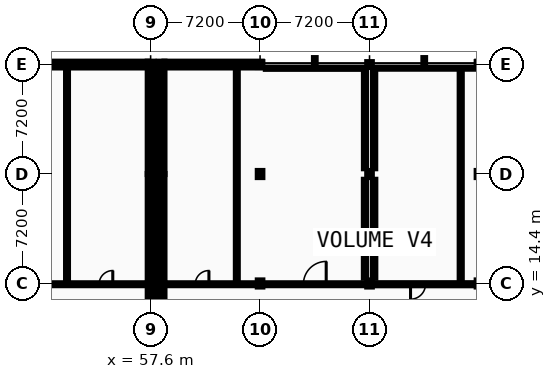
"""IFC4 building model, lengths in metres.
Left out: names, types, materials, properties, quantities, classifications, styles, units other than length and angle.
Written with IfcOpenShell. Run it as: python <this file> out.ifc"""

import sys

from ifc_helpers import new_model, si_unit, direction, frame, frame_2d, origin, origin_2d, place, context, subcontext, project, spatial, rectangle, i_section, extrude, element, fill, save


model = new_model("IFC4")
c1 = context("Model", 3, precision=1e-05, world=origin(), true_north=direction((0.0, 1.0)))
c2 = subcontext(c1, "Body", "Model", "MODEL_VIEW")
j1 = project(units=[si_unit("LENGTHUNIT", "METRE"), si_unit("PLANEANGLEUNIT", "RADIAN")], contexts=[c1])
p1 = place(None, origin())
s1 = spatial("IfcSite", under=j1, at=p1, CompositionType="ELEMENT")
p2 = place(p1, origin())
s2 = spatial("IfcBuilding", under=s1, at=p2, CompositionType="ELEMENT")
p3 = place(p2, frame((0.0, 0.0, 5.2)))
s3 = spatial("IfcBuildingStorey", under=s2, at=p3, CompositionType="ELEMENT", Elevation=5.2)
for number, where, z_axis, x_axis in (
    (1, (57.6, 14.4, 0.0), (0.0, 0.0, 1.0), (1.0, 0.0, 0.0)),
    (2, (57.6, 21.6, 0.0), (0.0, 0.0, 1.0), (1.0, 0.0, 0.0)),
):
    element("IfcColumn", number, at=place(p3, frame(where, z_axis=z_axis, x_axis=x_axis)), inside=s3, PredefinedType="COLUMN", context=c2, shape_type="SweptSolid", body=[
        extrude(i_section(OverallWidth=0.3, OverallDepth=0.4, WebThickness=0.013, FlangeThickness=0.024, FilletRadius=0.027, at=origin_2d()), origin(), (0.0, 0.0, 1.0), 4.4),
    ])
p4 = place(p3, frame((57.6, 28.8, 0.0), z_axis=(0.0, 0.0, 1.0), x_axis=(1.0, 0.0, 0.0)))
e3 = element("IfcColumn", 3, at=p4, inside=s3, PredefinedType="COLUMN", context=c2, shape_type="SweptSolid", body=[
    extrude(i_section(OverallWidth=0.3, OverallDepth=0.32, WebThickness=0.011, FlangeThickness=0.021, FilletRadius=0.027, at=origin_2d()), origin(), (0.0, 0.0, 1.0), 4.4),
])
for number, where, z_axis, x_axis in (
    (4, (58.32, 14.4, 0.0), (0.0, 0.0, 1.0), (1.0, 0.0, 0.0)),
    (5, (58.32, 21.6, 0.0), (0.0, 0.0, 1.0), (1.0, 0.0, 0.0)),
):
    element("IfcColumn", number, at=place(p3, frame(where, z_axis=z_axis, x_axis=x_axis)), inside=s3, PredefinedType="COLUMN", context=c2, shape_type="SweptSolid", body=[
        extrude(i_section(OverallWidth=0.3, OverallDepth=0.4, WebThickness=0.013, FlangeThickness=0.024, FilletRadius=0.027, at=origin_2d()), origin(), (0.0, 0.0, 1.0), 4.4),
    ])
p5 = place(p3, frame((58.32, 28.8, 0.0), z_axis=(0.0, 0.0, 1.0), x_axis=(1.0, 0.0, 0.0)))
e6 = element("IfcColumn", 6, at=p5, inside=s3, PredefinedType="COLUMN", context=c2, shape_type="SweptSolid", body=[
    extrude(i_section(OverallWidth=0.3, OverallDepth=0.32, WebThickness=0.011, FlangeThickness=0.021, FilletRadius=0.027, at=origin_2d()), origin(), (0.0, 0.0, 1.0), 4.4),
])
for number, where, z_axis, x_axis in (
    (7, (64.8, 14.4, 0.0), (0.0, 0.0, 1.0), (1.0, 0.0, 0.0)),
    (8, (64.8, 21.6, 0.0), (0.0, 0.0, 1.0), (1.0, 0.0, 0.0)),
):
    element("IfcColumn", number, at=place(p3, frame(where, z_axis=z_axis, x_axis=x_axis)), inside=s3, PredefinedType="COLUMN", context=c2, shape_type="SweptSolid", body=[
        extrude(i_section(OverallWidth=0.3, OverallDepth=0.4, WebThickness=0.013, FlangeThickness=0.024, FilletRadius=0.027, at=origin_2d()), origin(), (0.0, 0.0, 1.0), 4.4),
    ])
p6 = place(p3, frame((64.8, 28.8, 0.0), z_axis=(0.0, 0.0, 1.0), x_axis=(1.0, 0.0, 0.0)))
e9 = element("IfcColumn", 9, at=p6, inside=s3, PredefinedType="COLUMN", context=c2, shape_type="SweptSolid", body=[
    extrude(i_section(OverallWidth=0.3, OverallDepth=0.32, WebThickness=0.011, FlangeThickness=0.021, FilletRadius=0.027, at=origin_2d()), origin(), (0.0, 0.0, 1.0), 4.4),
])
for number, where, z_axis, x_axis in (
    (10, (72.0, 14.4, 0.0), (0.0, 0.0, 1.0), (1.0, 0.0, 0.0)),
    (11, (72.0, 21.6, 0.0), (0.0, 0.0, 1.0), (1.0, 0.0, 0.0)),
):
    element("IfcColumn", number, at=place(p3, frame(where, z_axis=z_axis, x_axis=x_axis)), inside=s3, PredefinedType="COLUMN", context=c2, shape_type="SweptSolid", body=[
        extrude(i_section(OverallWidth=0.3, OverallDepth=0.4, WebThickness=0.013, FlangeThickness=0.024, FilletRadius=0.027, at=origin_2d()), origin(), (0.0, 0.0, 1.0), 4.4),
    ])
p7 = place(p3, frame((72.0, 28.8, 0.0), z_axis=(0.0, 0.0, 1.0), x_axis=(1.0, 0.0, 0.0)))
e12 = element("IfcColumn", 12, at=p7, inside=s3, PredefinedType="COLUMN", context=c2, shape_type="SweptSolid", body=[
    extrude(i_section(OverallWidth=0.3, OverallDepth=0.32, WebThickness=0.011, FlangeThickness=0.021, FilletRadius=0.027, at=origin_2d()), origin(), (0.0, 0.0, 1.0), 4.4),
])
p8 = place(p3, frame((57.41, 28.8, 0.0), z_axis=(0.0, 0.0, 1.0), x_axis=(-1.0, 0.0, 0.0)))
e13 = element("IfcWall", 13, at=p8, inside=s3, PredefinedType="STANDARD", context=c2, shape_type="SweptSolid", body=[
    extrude(rectangle(XDim=7.12, YDim=0.38, at=frame_2d((3.56, 0.0))), origin(), (0.0, 0.0, 1.0), 3.88),
])
p9 = place(p8, frame((1.672, 0.0, 0.95)))
e14 = element("IfcOpeningElement", 14, at=p9, cuts=e13, PredefinedType="OPENING", context=c2, shape_type="SweptSolid", body=[
    extrude(rectangle(XDim=0.928, YDim=1.332, at=frame_2d((0.464, 0.666))), frame((0.0, 0.2, 0.0), z_axis=(0.0, -1.0, 0.0), x_axis=(1.0, 0.0, 0.0)), (0.0, 0.0, 1.0), 0.4),
])
p10 = place(p3, frame((57.6, 8.9, 0.0), z_axis=(0.0, 0.0, 1.0), x_axis=(0.0, 1.0, 0.0)))
e15 = element("IfcWall", 15, at=p10, inside=s3, PredefinedType="STANDARD", context=c2, shape_type="SweptSolid", body=[
    extrude(rectangle(XDim=5.5, YDim=0.38, at=frame_2d((2.75, 0.0))), origin(), (0.0, 0.0, 1.0), 4.185),
])
p11 = place(p3, frame((57.6, 14.4, 0.0), z_axis=(0.0, 0.0, 1.0), x_axis=(0.0, 1.0, 0.0)))
e16 = element("IfcWall", 16, at=p11, inside=s3, PredefinedType="STANDARD", context=c2, shape_type="SweptSolid", body=[
    extrude(rectangle(XDim=7.2, YDim=0.38, at=frame_2d((3.6, 0.0))), origin(), (0.0, 0.0, 1.0), 3.88),
])
p12 = place(p11, frame((1.577, 0.0, 0.95)))
e17 = element("IfcOpeningElement", 17, at=p12, cuts=e16, PredefinedType="OPENING", context=c2, shape_type="SweptSolid", body=[
    extrude(rectangle(XDim=1.166, YDim=1.332, at=frame_2d((0.583, 0.666))), frame((0.0, 0.2, 0.0), z_axis=(0.0, -1.0, 0.0), x_axis=(1.0, 0.0, 0.0)), (0.0, 0.0, 1.0), 0.4),
])
p13 = place(p11, frame((4.457, 0.0, 0.95)))
e18 = element("IfcOpeningElement", 18, at=p13, cuts=e16, PredefinedType="OPENING", context=c2, shape_type="SweptSolid", body=[
    extrude(rectangle(XDim=1.166, YDim=1.332, at=frame_2d((0.583, 0.666))), frame((0.0, 0.2, 0.0), z_axis=(0.0, -1.0, 0.0), x_axis=(1.0, 0.0, 0.0)), (0.0, 0.0, 1.0), 0.4),
])
p14 = place(p3, frame((57.6, 21.6, 0.0), z_axis=(0.0, 0.0, 1.0), x_axis=(0.0, 1.0, 0.0)))
e19 = element("IfcWall", 19, at=p14, inside=s3, PredefinedType="STANDARD", context=c2, shape_type="SweptSolid", body=[
    extrude(rectangle(XDim=7.39, YDim=0.38, at=frame_2d((3.695, 0.0))), origin(), (0.0, 0.0, 1.0), 3.88),
])
p15 = place(p14, frame((1.617, 0.0, 0.95)))
e20 = element("IfcOpeningElement", 20, at=p15, cuts=e19, PredefinedType="OPENING", context=c2, shape_type="SweptSolid", body=[
    extrude(rectangle(XDim=1.2, YDim=1.332, at=frame_2d((0.6, 0.666))), frame((0.0, 0.2, 0.0), z_axis=(0.0, -1.0, 0.0), x_axis=(1.0, 0.0, 0.0)), (0.0, 0.0, 1.0), 0.4),
])
p16 = place(p14, frame((4.573, 0.0, 0.95)))
e21 = element("IfcOpeningElement", 21, at=p16, cuts=e19, PredefinedType="OPENING", context=c2, shape_type="SweptSolid", body=[
    extrude(rectangle(XDim=1.2, YDim=1.332, at=frame_2d((0.6, 0.666))), frame((0.0, 0.2, 0.0), z_axis=(0.0, -1.0, 0.0), x_axis=(1.0, 0.0, 0.0)), (0.0, 0.0, 1.0), 0.4),
])
p17 = place(p3, frame((64.91, 28.8, 0.0), z_axis=(0.0, 0.0, 1.0), x_axis=(-1.0, 0.0, 0.0)))
e22 = element("IfcWall", 22, at=p17, inside=s3, PredefinedType="STANDARD", context=c2, shape_type="SweptSolid", body=[
    extrude(rectangle(XDim=6.4, YDim=0.38, at=frame_2d((3.2, 0.0))), origin(), (0.0, 0.0, 1.0), 3.88),
])
p18 = place(p3, frame((58.32, 14.4, 0.0), z_axis=(0.0, 0.0, 1.0), x_axis=(0.0, -1.0, 0.0)))
e23 = element("IfcWall", 23, at=p18, inside=s3, PredefinedType="STANDARD", context=c2, shape_type="SweptSolid", body=[
    extrude(rectangle(XDim=5.5, YDim=0.38, at=frame_2d((2.75, 0.0))), origin(), (0.0, 0.0, 1.0), 4.185),
])
p19 = place(p3, frame((58.32, 21.6, 0.0), z_axis=(0.0, 0.0, 1.0), x_axis=(0.0, -1.0, 0.0)))
e24 = element("IfcWall", 24, at=p19, inside=s3, PredefinedType="STANDARD", context=c2, shape_type="SweptSolid", body=[
    extrude(rectangle(XDim=7.2, YDim=0.38, at=frame_2d((3.6, 0.0))), origin(), (0.0, 0.0, 1.0), 3.88),
])
p20 = place(p19, frame((1.713, 0.0, 0.95)))
e25 = element("IfcOpeningElement", 25, at=p20, cuts=e24, PredefinedType="OPENING", context=c2, shape_type="SweptSolid", body=[
    extrude(rectangle(XDim=0.894, YDim=1.296, at=frame_2d((0.447, 0.648))), frame((0.0, 0.2, 0.0), z_axis=(0.0, -1.0, 0.0), x_axis=(1.0, 0.0, 0.0)), (0.0, 0.0, 1.0), 0.4),
])
p21 = place(p19, frame((4.593, 0.0, 0.95)))
e26 = element("IfcOpeningElement", 26, at=p21, cuts=e24, PredefinedType="OPENING", context=c2, shape_type="SweptSolid", body=[
    extrude(rectangle(XDim=0.894, YDim=1.296, at=frame_2d((0.447, 0.648))), frame((0.0, 0.2, 0.0), z_axis=(0.0, -1.0, 0.0), x_axis=(1.0, 0.0, 0.0)), (0.0, 0.0, 1.0), 0.4),
])
p22 = place(p3, frame((58.32, 28.99, 0.0), z_axis=(0.0, 0.0, 1.0), x_axis=(0.0, -1.0, 0.0)))
e27 = element("IfcWall", 27, at=p22, inside=s3, PredefinedType="STANDARD", context=c2, shape_type="SweptSolid", body=[
    extrude(rectangle(XDim=7.39, YDim=0.38, at=frame_2d((3.695, 0.0))), origin(), (0.0, 0.0, 1.0), 3.88),
])
p23 = place(p22, frame((1.753, 0.0, 0.95)))
e28 = element("IfcOpeningElement", 28, at=p23, cuts=e27, PredefinedType="OPENING", context=c2, shape_type="SweptSolid", body=[
    extrude(rectangle(XDim=0.928, YDim=1.296, at=frame_2d((0.464, 0.648))), frame((0.0, 0.2, 0.0), z_axis=(0.0, -1.0, 0.0), x_axis=(1.0, 0.0, 0.0)), (0.0, 0.0, 1.0), 0.4),
])
p24 = place(p22, frame((4.709, 0.0, 0.95)))
e29 = element("IfcOpeningElement", 29, at=p24, cuts=e27, PredefinedType="OPENING", context=c2, shape_type="SweptSolid", body=[
    extrude(rectangle(XDim=0.928, YDim=1.296, at=frame_2d((0.464, 0.648))), frame((0.0, 0.2, 0.0), z_axis=(0.0, -1.0, 0.0), x_axis=(1.0, 0.0, 0.0)), (0.0, 0.0, 1.0), 0.4),
])
p25 = place(p3, frame((50.78, 14.35, 0.0), z_axis=(0.0, 0.0, 1.0), x_axis=(1.0, 0.0, 0.0)))
e30 = element("IfcWall", 30, at=p25, inside=s3, PredefinedType="PARTITIONING", context=c2, shape_type="SweptSolid", body=[
    extrude(rectangle(XDim=6.44, YDim=0.125, at=frame_2d((3.22, 0.0))), origin(), (0.0, 0.0, 1.0), 3.88),
])
p26 = place(p25, frame((3.43, 0.0, 0.0)))
e31 = element("IfcOpeningElement", 31, at=p26, cuts=e30, PredefinedType="OPENING", context=c2, shape_type="SweptSolid", body=[
    extrude(rectangle(XDim=0.9, YDim=2.1, at=frame_2d((0.45, 1.05))), frame((0.0, 0.073, 0.0), z_axis=(0.0, -1.0, 0.0), x_axis=(1.0, 0.0, 0.0)), (0.0, 0.0, 1.0), 0.145),
])
p27 = place(p3, frame((58.7, 14.35, 0.0), z_axis=(0.0, 0.0, 1.0), x_axis=(1.0, 0.0, 0.0)))
e32 = element("IfcWall", 32, at=p27, inside=s3, PredefinedType="PARTITIONING", context=c2, shape_type="SweptSolid", body=[
    extrude(rectangle(XDim=5.72, YDim=0.125, at=frame_2d((2.86, 0.0))), origin(), (0.0, 0.0, 1.0), 3.88),
])
p28 = place(p27, frame((1.835, 0.0, 0.0)))
e33 = element("IfcOpeningElement", 33, at=p28, cuts=e32, PredefinedType="OPENING", context=c2, shape_type="SweptSolid", body=[
    extrude(rectangle(XDim=0.9, YDim=2.1, at=frame_2d((0.45, 1.05))), frame((0.0, 0.073, 0.0), z_axis=(0.0, -1.0, 0.0), x_axis=(1.0, 0.0, 0.0)), (0.0, 0.0, 1.0), 0.145),
])
p29 = place(p3, frame((65.18, 14.35, 0.0), z_axis=(0.0, 0.0, 1.0), x_axis=(1.0, 0.0, 0.0)))
e34 = element("IfcWall", 34, at=p29, inside=s3, PredefinedType="PARTITIONING", context=c2, shape_type="SweptSolid", body=[
    extrude(rectangle(XDim=6.44, YDim=0.125, at=frame_2d((3.22, 0.0))), origin(), (0.0, 0.0, 1.0), 3.88),
])
p30 = place(p29, frame((2.47, 0.0, 0.0)))
e35 = element("IfcOpeningElement", 35, at=p30, cuts=e34, PredefinedType="OPENING", context=c2, shape_type="SweptSolid", body=[
    extrude(rectangle(XDim=1.5, YDim=2.2, at=frame_2d((0.75, 1.1))), frame((0.0, 0.073, 0.0), z_axis=(0.0, -1.0, 0.0), x_axis=(1.0, 0.0, 0.0)), (0.0, 0.0, 1.0), 0.145),
])
p31 = place(p3, frame((72.38, 14.35, 0.0), z_axis=(0.0, 0.0, 1.0), x_axis=(1.0, 0.0, 0.0)))
e36 = element("IfcWall", 36, at=p31, inside=s3, PredefinedType="PARTITIONING", context=c2, shape_type="SweptSolid", body=[
    extrude(rectangle(XDim=6.44, YDim=0.135, at=frame_2d((3.22, 0.0))), origin(), (0.0, 0.0, 1.0), 3.88),
])
p32 = place(p31, frame((2.318, 0.0, 0.0)))
e37 = element("IfcOpeningElement", 37, at=p32, cuts=e36, PredefinedType="OPENING", context=c2, shape_type="SweptSolid", body=[
    extrude(rectangle(XDim=0.984, YDim=2.124, at=frame_2d((0.492, 1.062))), frame((0.0, 0.078, 0.0), z_axis=(0.0, -1.0, 0.0), x_axis=(1.0, 0.0, 0.0)), (0.0, 0.0, 1.0), 0.155),
])
p33 = place(p3, frame((65.18, 28.6, 0.0), z_axis=(0.0, 0.0, 1.0), x_axis=(1.0, 0.0, 0.0)))
e38 = element("IfcWall", 38, at=p33, inside=s3, PredefinedType="PARTITIONING", context=c2, shape_type="SweptSolid", body=[
    extrude(rectangle(XDim=6.44, YDim=0.16, at=frame_2d((3.22, 0.0))), origin(), (0.0, 0.0, 1.0), 3.88),
])
p34 = place(p3, frame((72.38, 28.6, 0.0), z_axis=(0.0, 0.0, 1.0), x_axis=(1.0, 0.0, 0.0)))
e39 = element("IfcWall", 39, at=p34, inside=s3, PredefinedType="PARTITIONING", context=c2, shape_type="SweptSolid", body=[
    extrude(rectangle(XDim=6.44, YDim=0.142, at=frame_2d((3.22, 0.0))), origin(), (0.0, 0.0, 1.0), 3.88),
])
for number, where, z_axis, x_axis in (
    (40, (52.1, 14.413, 0.0), (0.0, 0.0, 1.0), (0.0, 1.0, 0.0)),
    (41, (63.27, 14.413, 0.0), (0.0, 0.0, 1.0), (0.0, 1.0, 0.0)),
):
    element("IfcWall", number, at=place(p3, frame(where, z_axis=z_axis, x_axis=x_axis)), inside=s3, PredefinedType="PARTITIONING", context=c2, shape_type="SweptSolid", body=[
        extrude(rectangle(XDim=14.188, YDim=0.125, at=frame_2d((7.094, 0.0))), origin(), (0.0, 0.0, 1.0), 4.185),
    ])
p35 = place(p3, frame((71.7, 14.78, 0.0), z_axis=(0.0, 0.0, 1.0), x_axis=(0.0, 1.0, 0.0)))
e42 = element("IfcWall", 42, at=p35, inside=s3, PredefinedType="PARTITIONING", context=c2, shape_type="SweptSolid", body=[
    extrude(rectangle(XDim=6.44, YDim=0.142, at=frame_2d((3.22, 0.0))), origin(), (0.0, 0.0, 1.0), 3.88),
])
p36 = place(p3, frame((71.7, 21.98, 0.0), z_axis=(0.0, 0.0, 1.0), x_axis=(0.0, 1.0, 0.0)))
e43 = element("IfcWall", 43, at=p36, inside=s3, PredefinedType="PARTITIONING", context=c2, shape_type="SweptSolid", body=[
    extrude(rectangle(XDim=6.44, YDim=0.135, at=frame_2d((3.22, 0.0))), origin(), (0.0, 0.0, 1.0), 4.185),
])
p37 = place(p3, frame((72.3, 14.78, 0.0), z_axis=(0.0, 0.0, 1.0), x_axis=(0.0, 1.0, 0.0)))
e44 = element("IfcWall", 44, at=p37, inside=s3, PredefinedType="PARTITIONING", context=c2, shape_type="SweptSolid", body=[
    extrude(rectangle(XDim=6.44, YDim=0.16, at=frame_2d((3.22, 0.0))), origin(), (0.0, 0.0, 1.0), 3.88),
])
p38 = place(p3, frame((72.3, 21.98, 0.0), z_axis=(0.0, 0.0, 1.0), x_axis=(0.0, 1.0, 0.0)))
e45 = element("IfcWall", 45, at=p38, inside=s3, PredefinedType="PARTITIONING", context=c2, shape_type="SweptSolid", body=[
    extrude(rectangle(XDim=6.44, YDim=0.15, at=frame_2d((3.22, 0.0))), origin(), (0.0, 0.0, 1.0), 3.88),
])
p39 = place(p3, frame((78.0, 14.417, 0.0), z_axis=(0.0, 0.0, 1.0), x_axis=(0.0, 1.0, 0.0)))
e46 = element("IfcWall", 46, at=p39, inside=s3, PredefinedType="PARTITIONING", context=c2, shape_type="SweptSolid", body=[
    extrude(rectangle(XDim=14.112, YDim=0.135, at=frame_2d((7.056, 0.0))), origin(), (0.0, 0.0, 1.0), 4.185),
])
p40 = place(p9, origin())
e47 = element("IfcWindow", 47, at=p40, inside=s3, PartitioningType="SINGLE_PANEL", PredefinedType="WINDOW", context=c2, shape_type="SweptSolid", body=[
    extrude(rectangle(XDim=0.928, YDim=1.332, at=frame_2d((0.464, 0.666))), frame((0.0, 0.03, 0.0), z_axis=(0.0, -1.0, 0.0), x_axis=(1.0, 0.0, 0.0)), (0.0, 0.0, 1.0), 0.06),
])
fill(e14, e47)
p41 = place(p12, origin())
e48 = element("IfcWindow", 48, at=p41, inside=s3, PartitioningType="SINGLE_PANEL", PredefinedType="WINDOW", context=c2, shape_type="SweptSolid", body=[
    extrude(rectangle(XDim=1.166, YDim=1.332, at=frame_2d((0.583, 0.666))), frame((0.0, 0.03, 0.0), z_axis=(0.0, -1.0, 0.0), x_axis=(1.0, 0.0, 0.0)), (0.0, 0.0, 1.0), 0.06),
])
fill(e17, e48)
p42 = place(p13, origin())
e49 = element("IfcWindow", 49, at=p42, inside=s3, PartitioningType="SINGLE_PANEL", PredefinedType="WINDOW", context=c2, shape_type="SweptSolid", body=[
    extrude(rectangle(XDim=1.166, YDim=1.332, at=frame_2d((0.583, 0.666))), frame((0.0, 0.03, 0.0), z_axis=(0.0, -1.0, 0.0), x_axis=(1.0, 0.0, 0.0)), (0.0, 0.0, 1.0), 0.06),
])
fill(e18, e49)
p43 = place(p15, origin())
e50 = element("IfcWindow", 50, at=p43, inside=s3, PartitioningType="SINGLE_PANEL", PredefinedType="WINDOW", context=c2, shape_type="SweptSolid", body=[
    extrude(rectangle(XDim=1.2, YDim=1.332, at=frame_2d((0.6, 0.666))), frame((0.0, 0.03, 0.0), z_axis=(0.0, -1.0, 0.0), x_axis=(1.0, 0.0, 0.0)), (0.0, 0.0, 1.0), 0.06),
])
fill(e20, e50)
p44 = place(p16, origin())
e51 = element("IfcWindow", 51, at=p44, inside=s3, PartitioningType="SINGLE_PANEL", PredefinedType="WINDOW", context=c2, shape_type="SweptSolid", body=[
    extrude(rectangle(XDim=1.2, YDim=1.332, at=frame_2d((0.6, 0.666))), frame((0.0, 0.03, 0.0), z_axis=(0.0, -1.0, 0.0), x_axis=(1.0, 0.0, 0.0)), (0.0, 0.0, 1.0), 0.06),
])
fill(e21, e51)
p45 = place(p20, origin())
e52 = element("IfcWindow", 52, at=p45, inside=s3, PartitioningType="SINGLE_PANEL", PredefinedType="WINDOW", context=c2, shape_type="SweptSolid", body=[
    extrude(rectangle(XDim=0.894, YDim=1.296, at=frame_2d((0.447, 0.648))), frame((0.0, 0.03, 0.0), z_axis=(0.0, -1.0, 0.0), x_axis=(1.0, 0.0, 0.0)), (0.0, 0.0, 1.0), 0.06),
])
fill(e25, e52)
p46 = place(p21, origin())
e53 = element("IfcWindow", 53, at=p46, inside=s3, PartitioningType="SINGLE_PANEL", PredefinedType="WINDOW", context=c2, shape_type="SweptSolid", body=[
    extrude(rectangle(XDim=0.894, YDim=1.296, at=frame_2d((0.447, 0.648))), frame((0.0, 0.03, 0.0), z_axis=(0.0, -1.0, 0.0), x_axis=(1.0, 0.0, 0.0)), (0.0, 0.0, 1.0), 0.06),
])
fill(e26, e53)
p47 = place(p23, origin())
e54 = element("IfcWindow", 54, at=p47, inside=s3, PartitioningType="SINGLE_PANEL", PredefinedType="WINDOW", context=c2, shape_type="SweptSolid", body=[
    extrude(rectangle(XDim=0.928, YDim=1.296, at=frame_2d((0.464, 0.648))), frame((0.0, 0.03, 0.0), z_axis=(0.0, -1.0, 0.0), x_axis=(1.0, 0.0, 0.0)), (0.0, 0.0, 1.0), 0.06),
])
fill(e28, e54)
p48 = place(p24, origin())
e55 = element("IfcWindow", 55, at=p48, inside=s3, PartitioningType="SINGLE_PANEL", PredefinedType="WINDOW", context=c2, shape_type="SweptSolid", body=[
    extrude(rectangle(XDim=0.928, YDim=1.296, at=frame_2d((0.464, 0.648))), frame((0.0, 0.03, 0.0), z_axis=(0.0, -1.0, 0.0), x_axis=(1.0, 0.0, 0.0)), (0.0, 0.0, 1.0), 0.06),
])
fill(e29, e55)
p49 = place(p26, frame((0.9, 0.0, 0.0), z_axis=(0.0, 0.0, 1.0), x_axis=(-1.0, 0.0, 0.0)))
e56 = element("IfcDoor", 56, at=p49, inside=s3, OperationType="SINGLE_SWING_RIGHT", PredefinedType="DOOR", context=c2, shape_type="SweptSolid", body=[
    extrude(rectangle(XDim=0.9, YDim=2.1, at=frame_2d((0.45, 1.05))), frame((0.0, 0.025, 0.0), z_axis=(0.0, -1.0, 0.0), x_axis=(1.0, 0.0, 0.0)), (0.0, 0.0, 1.0), 0.05),
])
fill(e31, e56)
p50 = place(p28, frame((0.9, 0.0, 0.0), z_axis=(0.0, 0.0, 1.0), x_axis=(-1.0, 0.0, 0.0)))
e57 = element("IfcDoor", 57, at=p50, inside=s3, OperationType="SINGLE_SWING_RIGHT", PredefinedType="DOOR", context=c2, shape_type="SweptSolid", body=[
    extrude(rectangle(XDim=0.9, YDim=2.1, at=frame_2d((0.45, 1.05))), frame((0.0, 0.025, 0.0), z_axis=(0.0, -1.0, 0.0), x_axis=(1.0, 0.0, 0.0)), (0.0, 0.0, 1.0), 0.05),
])
fill(e33, e57)
p51 = place(p32, frame((0.984, 0.0, 0.0), z_axis=(0.0, 0.0, 1.0), x_axis=(-1.0, 0.0, 0.0)))
e58 = element("IfcDoor", 58, at=p51, inside=s3, OperationType="SINGLE_SWING_LEFT", PredefinedType="DOOR", context=c2, shape_type="SweptSolid", body=[
    extrude(rectangle(XDim=0.984, YDim=2.124, at=frame_2d((0.492, 1.062))), frame((0.0, 0.025, 0.0), z_axis=(0.0, -1.0, 0.0), x_axis=(1.0, 0.0, 0.0)), (0.0, 0.0, 1.0), 0.05),
])
fill(e37, e58)
p52 = place(p30, frame((1.5, 0.0, 0.0), z_axis=(0.0, 0.0, 1.0), x_axis=(-1.0, 0.0, 0.0)))
e59 = element("IfcDoor", 59, at=p52, inside=s3, OperationType="DOUBLE_DOOR_SINGLE_SWING", PredefinedType="DOOR", context=c2, shape_type="SweptSolid", body=[
    extrude(rectangle(XDim=1.5, YDim=2.2, at=frame_2d((0.75, 1.1))), frame((0.0, 0.025, 0.0), z_axis=(0.0, -1.0, 0.0), x_axis=(1.0, 0.0, 0.0)), (0.0, 0.0, 1.0), 0.05),
])
fill(e35, e59)
save(model, sys.argv[1])
